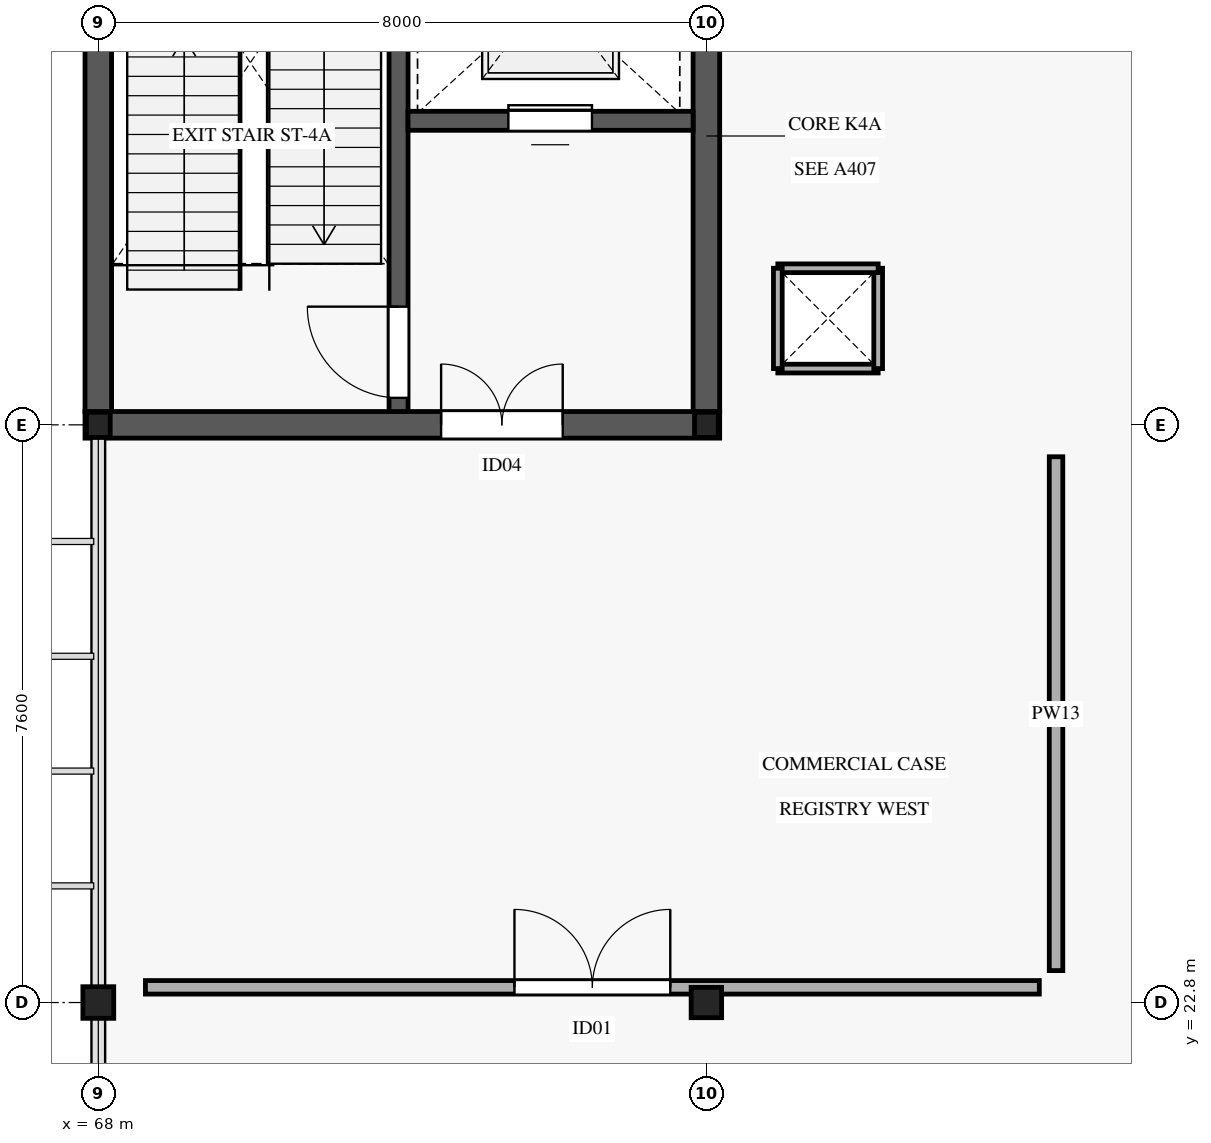
"""IFC4 building model, lengths in metres.
Left out: names, types, materials, properties, quantities, classifications, styles, units other than length and angle.
Written with IfcOpenShell. Run it as: python <this file> out.ifc"""

import sys

from ifc_helpers import new_model, si_unit, direction, frame, frame_2d, origin, origin_2d, place, context, subcontext, project, spatial, rectangle, i_section, extrude, element, fill, save


model = new_model("IFC4")
c1 = context("Model", 3, precision=1e-05, world=origin(), true_north=direction((0.0, 1.0)))
c2 = subcontext(c1, "Body", "Model", "MODEL_VIEW")
j1 = project(units=[si_unit("LENGTHUNIT", "METRE"), si_unit("PLANEANGLEUNIT", "RADIAN")], contexts=[c1])
p1 = place(None, origin())
s1 = spatial("IfcSite", under=j1, at=p1, CompositionType="ELEMENT")
p2 = place(p1, origin())
s2 = spatial("IfcBuilding", under=s1, at=p2, CompositionType="ELEMENT")
p3 = place(p2, frame((0.0, 0.0, 5.4)))
s3 = spatial("IfcBuildingStorey", under=s2, at=p3, CompositionType="ELEMENT", Elevation=5.4)
p4 = place(p3, frame((68.0, 22.8, 0.0), z_axis=(0.0, 0.0, 1.0), x_axis=(1.0, 0.0, 0.0)))
e1 = element("IfcColumn", 1, at=p4, inside=s3, PredefinedType="COLUMN", context=c2, shape_type="SweptSolid", body=[
    extrude(i_section(OverallWidth=0.406, OverallDepth=0.416, WebThickness=0.03, FlangeThickness=0.048, FilletRadius=0.015, at=origin_2d()), origin(), (0.0, 0.0, 1.0), 5.185),
])
p5 = place(p3, frame((68.0, 30.4, 0.0), z_axis=(0.0, 0.0, 1.0), x_axis=(1.0, 0.0, 0.0)))
e2 = element("IfcColumn", 2, at=p5, inside=s3, PredefinedType="COLUMN", context=c2, shape_type="SweptSolid", body=[
    extrude(i_section(OverallWidth=0.313, OverallDepth=0.333, WebThickness=0.018, FlangeThickness=0.028, FilletRadius=0.015, at=origin_2d()), origin(), (0.0, 0.0, 1.0), 5.185),
])
p6 = place(p3, frame((76.0, 22.8, 0.0), z_axis=(0.0, 0.0, 1.0), x_axis=(1.0, 0.0, 0.0)))
e3 = element("IfcColumn", 3, at=p6, inside=s3, PredefinedType="COLUMN", context=c2, shape_type="SweptSolid", body=[
    extrude(i_section(OverallWidth=0.401, OverallDepth=0.399, WebThickness=0.025, FlangeThickness=0.04, FilletRadius=0.015, at=origin_2d()), origin(), (0.0, 0.0, 1.0), 5.185),
])
p7 = place(p3, frame((76.0, 30.4, 0.0), z_axis=(0.0, 0.0, 1.0), x_axis=(1.0, 0.0, 0.0)))
e4 = element("IfcColumn", 4, at=p7, inside=s3, PredefinedType="COLUMN", context=c2, shape_type="SweptSolid", body=[
    extrude(i_section(OverallWidth=0.313, OverallDepth=0.333, WebThickness=0.018, FlangeThickness=0.028, FilletRadius=0.015, at=origin_2d()), origin(), (0.0, 0.0, 1.0), 5.185),
])
for number, where, z_axis, x_axis in (
    (5, (76.94, 31.14, 0.0), (0.0, 0.0, 1.0), (1.0, 0.0, 0.0)),
    (6, (78.26, 31.14, 0.0), (0.0, 0.0, 1.0), (0.0, 1.0, 0.0)),
    (7, (78.26, 32.46, 0.0), (0.0, 0.0, 1.0), (-1.0, 0.0, 0.0)),
    (8, (76.94, 32.46, 0.0), (0.0, 0.0, 1.0), (0.0, -1.0, 0.0)),
):
    element("IfcWall", number, at=place(p3, frame(where, z_axis=z_axis, x_axis=x_axis)), inside=s3, PredefinedType="PARTITIONING", context=c2, shape_type="SweptSolid", body=[
        extrude(rectangle(XDim=1.32, YDim=0.115, at=frame_2d((0.66, 0.0))), origin(), (0.0, 0.0, 1.0), 4.35),
    ])
p8 = place(p3, frame((67.825, 30.4, 0.0), z_axis=(0.0, 0.0, 1.0), x_axis=(1.0, 0.0, 0.0)))
e9 = element("IfcWall", 9, at=p8, inside=s3, PredefinedType="SHEAR", context=c2, shape_type="SweptSolid", body=[
    extrude(rectangle(XDim=8.35, YDim=0.35, at=frame_2d((4.175, 0.0))), origin(), (0.0, 0.0, 1.0), 5.19),
])
p9 = place(p8, frame((4.685, 0.0, 0.0)))
e10 = element("IfcOpeningElement", 10, at=p9, cuts=e9, PredefinedType="OPENING", context=c2, shape_type="SweptSolid", body=[
    extrude(rectangle(XDim=1.6, YDim=2.35, at=frame_2d((0.8, 1.175))), frame((0.0, 0.185, 0.0), z_axis=(0.0, -1.0, 0.0), x_axis=(1.0, 0.0, 0.0)), (0.0, 0.0, 1.0), 0.37),
])
for number, where, z_axis, x_axis in (
    (11, (68.0, 30.575, 0.0), (0.0, 0.0, 1.0), (0.0, 1.0, 0.0)),
    (12, (76.0, 30.575, 0.0), (0.0, 0.0, 1.0), (0.0, 1.0, 0.0)),
):
    element("IfcWall", number, at=place(p3, frame(where, z_axis=z_axis, x_axis=x_axis)), inside=s3, PredefinedType="SHEAR", context=c2, shape_type="SweptSolid", body=[
        extrude(rectangle(XDim=7.25, YDim=0.35, at=frame_2d((3.625, 0.0))), origin(), (0.0, 0.0, 1.0), 5.19),
    ])
p10 = place(p3, frame((71.95, 30.575, 0.0), z_axis=(0.0, 0.0, 1.0), x_axis=(0.0, 1.0, 0.0)))
e13 = element("IfcWall", 13, at=p10, inside=s3, PredefinedType="SHEAR", context=c2, shape_type="SweptSolid", body=[
    extrude(rectangle(XDim=7.25, YDim=0.25, at=frame_2d((3.625, 0.0))), origin(), (0.0, 0.0, 1.0), 5.19),
])
p11 = place(p10, frame((0.18, 0.0, 0.0)))
e14 = element("IfcOpeningElement", 14, at=p11, cuts=e13, PredefinedType="OPENING", context=c2, shape_type="SweptSolid", body=[
    extrude(rectangle(XDim=1.2, YDim=2.2, at=frame_2d((0.6, 1.1))), frame((0.0, 0.135, 0.0), z_axis=(0.0, -1.0, 0.0), x_axis=(1.0, 0.0, 0.0)), (0.0, 0.0, 1.0), 0.27),
])
p12 = place(p3, frame((72.075, 34.4, 0.0), z_axis=(0.0, 0.0, 1.0), x_axis=(1.0, 0.0, 0.0)))
e15 = element("IfcWall", 15, at=p12, inside=s3, PredefinedType="SHEAR", context=c2, shape_type="SweptSolid", body=[
    extrude(rectangle(XDim=3.75, YDim=0.25, at=frame_2d((1.875, 0.0))), origin(), (0.0, 0.0, 1.0), 5.19),
])
p13 = place(p12, frame((1.32, 0.0, 0.0)))
e16 = element("IfcOpeningElement", 16, at=p13, cuts=e15, PredefinedType="OPENING", context=c2, shape_type="SweptSolid", body=[
    extrude(rectangle(XDim=1.1, YDim=2.2, at=frame_2d((0.55, 1.1))), frame((0.0, 0.135, 0.0), z_axis=(0.0, -1.0, 0.0), x_axis=(1.0, 0.0, 0.0)), (0.0, 0.0, 1.0), 0.27),
])
p14 = place(p3, frame((68.62, 23.0, 0.0), z_axis=(0.0, 0.0, 1.0), x_axis=(1.0, 0.0, 0.0)))
e17 = element("IfcWall", 17, at=p14, inside=s3, PredefinedType="PARTITIONING", context=c2, shape_type="SweptSolid", body=[
    extrude(rectangle(XDim=11.76, YDim=0.178, at=frame_2d((5.88, 0.0))), origin(), (0.0, 0.0, 1.0), 4.05),
])
p15 = place(p14, frame((4.855, 0.0, 0.0)))
e18 = element("IfcOpeningElement", 18, at=p15, cuts=e17, PredefinedType="OPENING", context=c2, shape_type="SweptSolid", body=[
    extrude(rectangle(XDim=2.05, YDim=2.45, at=frame_2d((1.025, 1.225))), frame((0.0, 0.099, 0.0), z_axis=(0.0, -1.0, 0.0), x_axis=(1.0, 0.0, 0.0)), (0.0, 0.0, 1.0), 0.198),
])
p16 = place(p3, frame((80.6, 23.22, 0.0), z_axis=(0.0, 0.0, 1.0), x_axis=(0.0, 1.0, 0.0)))
e19 = element("IfcWall", 19, at=p16, inside=s3, PredefinedType="PARTITIONING", context=c2, shape_type="SweptSolid", body=[
    extrude(rectangle(XDim=6.76, YDim=0.178, at=frame_2d((3.38, 0.0))), origin(), (0.0, 0.0, 1.0), 4.05),
])
p17 = place(p11, origin())
e20 = element("IfcDoor", 20, at=p17, inside=s3, OperationType="SINGLE_SWING_RIGHT", PredefinedType="DOOR", context=c2, shape_type="SweptSolid", body=[
    extrude(rectangle(XDim=1.2, YDim=2.2, at=frame_2d((0.6, 1.1))), frame((0.0, 0.025, 0.0), z_axis=(0.0, -1.0, 0.0), x_axis=(1.0, 0.0, 0.0)), (0.0, 0.0, 1.0), 0.05),
])
fill(e14, e20)
p18 = place(p9, origin())
e21 = element("IfcDoor", 21, at=p18, inside=s3, OperationType="DOUBLE_DOOR_SINGLE_SWING", PredefinedType="DOOR", context=c2, shape_type="SweptSolid", body=[
    extrude(rectangle(XDim=1.6, YDim=2.35, at=frame_2d((0.8, 1.175))), frame((0.0, 0.025, 0.0), z_axis=(0.0, -1.0, 0.0), x_axis=(1.0, 0.0, 0.0)), (0.0, 0.0, 1.0), 0.05),
])
fill(e10, e21)
p19 = place(p13, origin())
e22 = element("IfcDoor", 22, at=p19, inside=s3, OperationType="SLIDING_TO_LEFT", PredefinedType="DOOR", context=c2, shape_type="SweptSolid", body=[
    extrude(rectangle(XDim=1.1, YDim=2.2, at=frame_2d((0.55, 1.1))), frame((0.0, 0.025, 0.0), z_axis=(0.0, -1.0, 0.0), x_axis=(1.0, 0.0, 0.0)), (0.0, 0.0, 1.0), 0.05),
])
fill(e16, e22)
p20 = place(p15, origin())
e23 = element("IfcDoor", 23, at=p20, inside=s3, OperationType="DOUBLE_DOOR_SINGLE_SWING", PredefinedType="DOOR", context=c2, shape_type="SweptSolid", body=[
    extrude(rectangle(XDim=2.05, YDim=2.45, at=frame_2d((1.025, 1.225))), frame((0.0, 0.025, 0.0), z_axis=(0.0, -1.0, 0.0), x_axis=(1.0, 0.0, 0.0)), (0.0, 0.0, 1.0), 0.05),
])
fill(e18, e23)
save(model, sys.argv[1])
